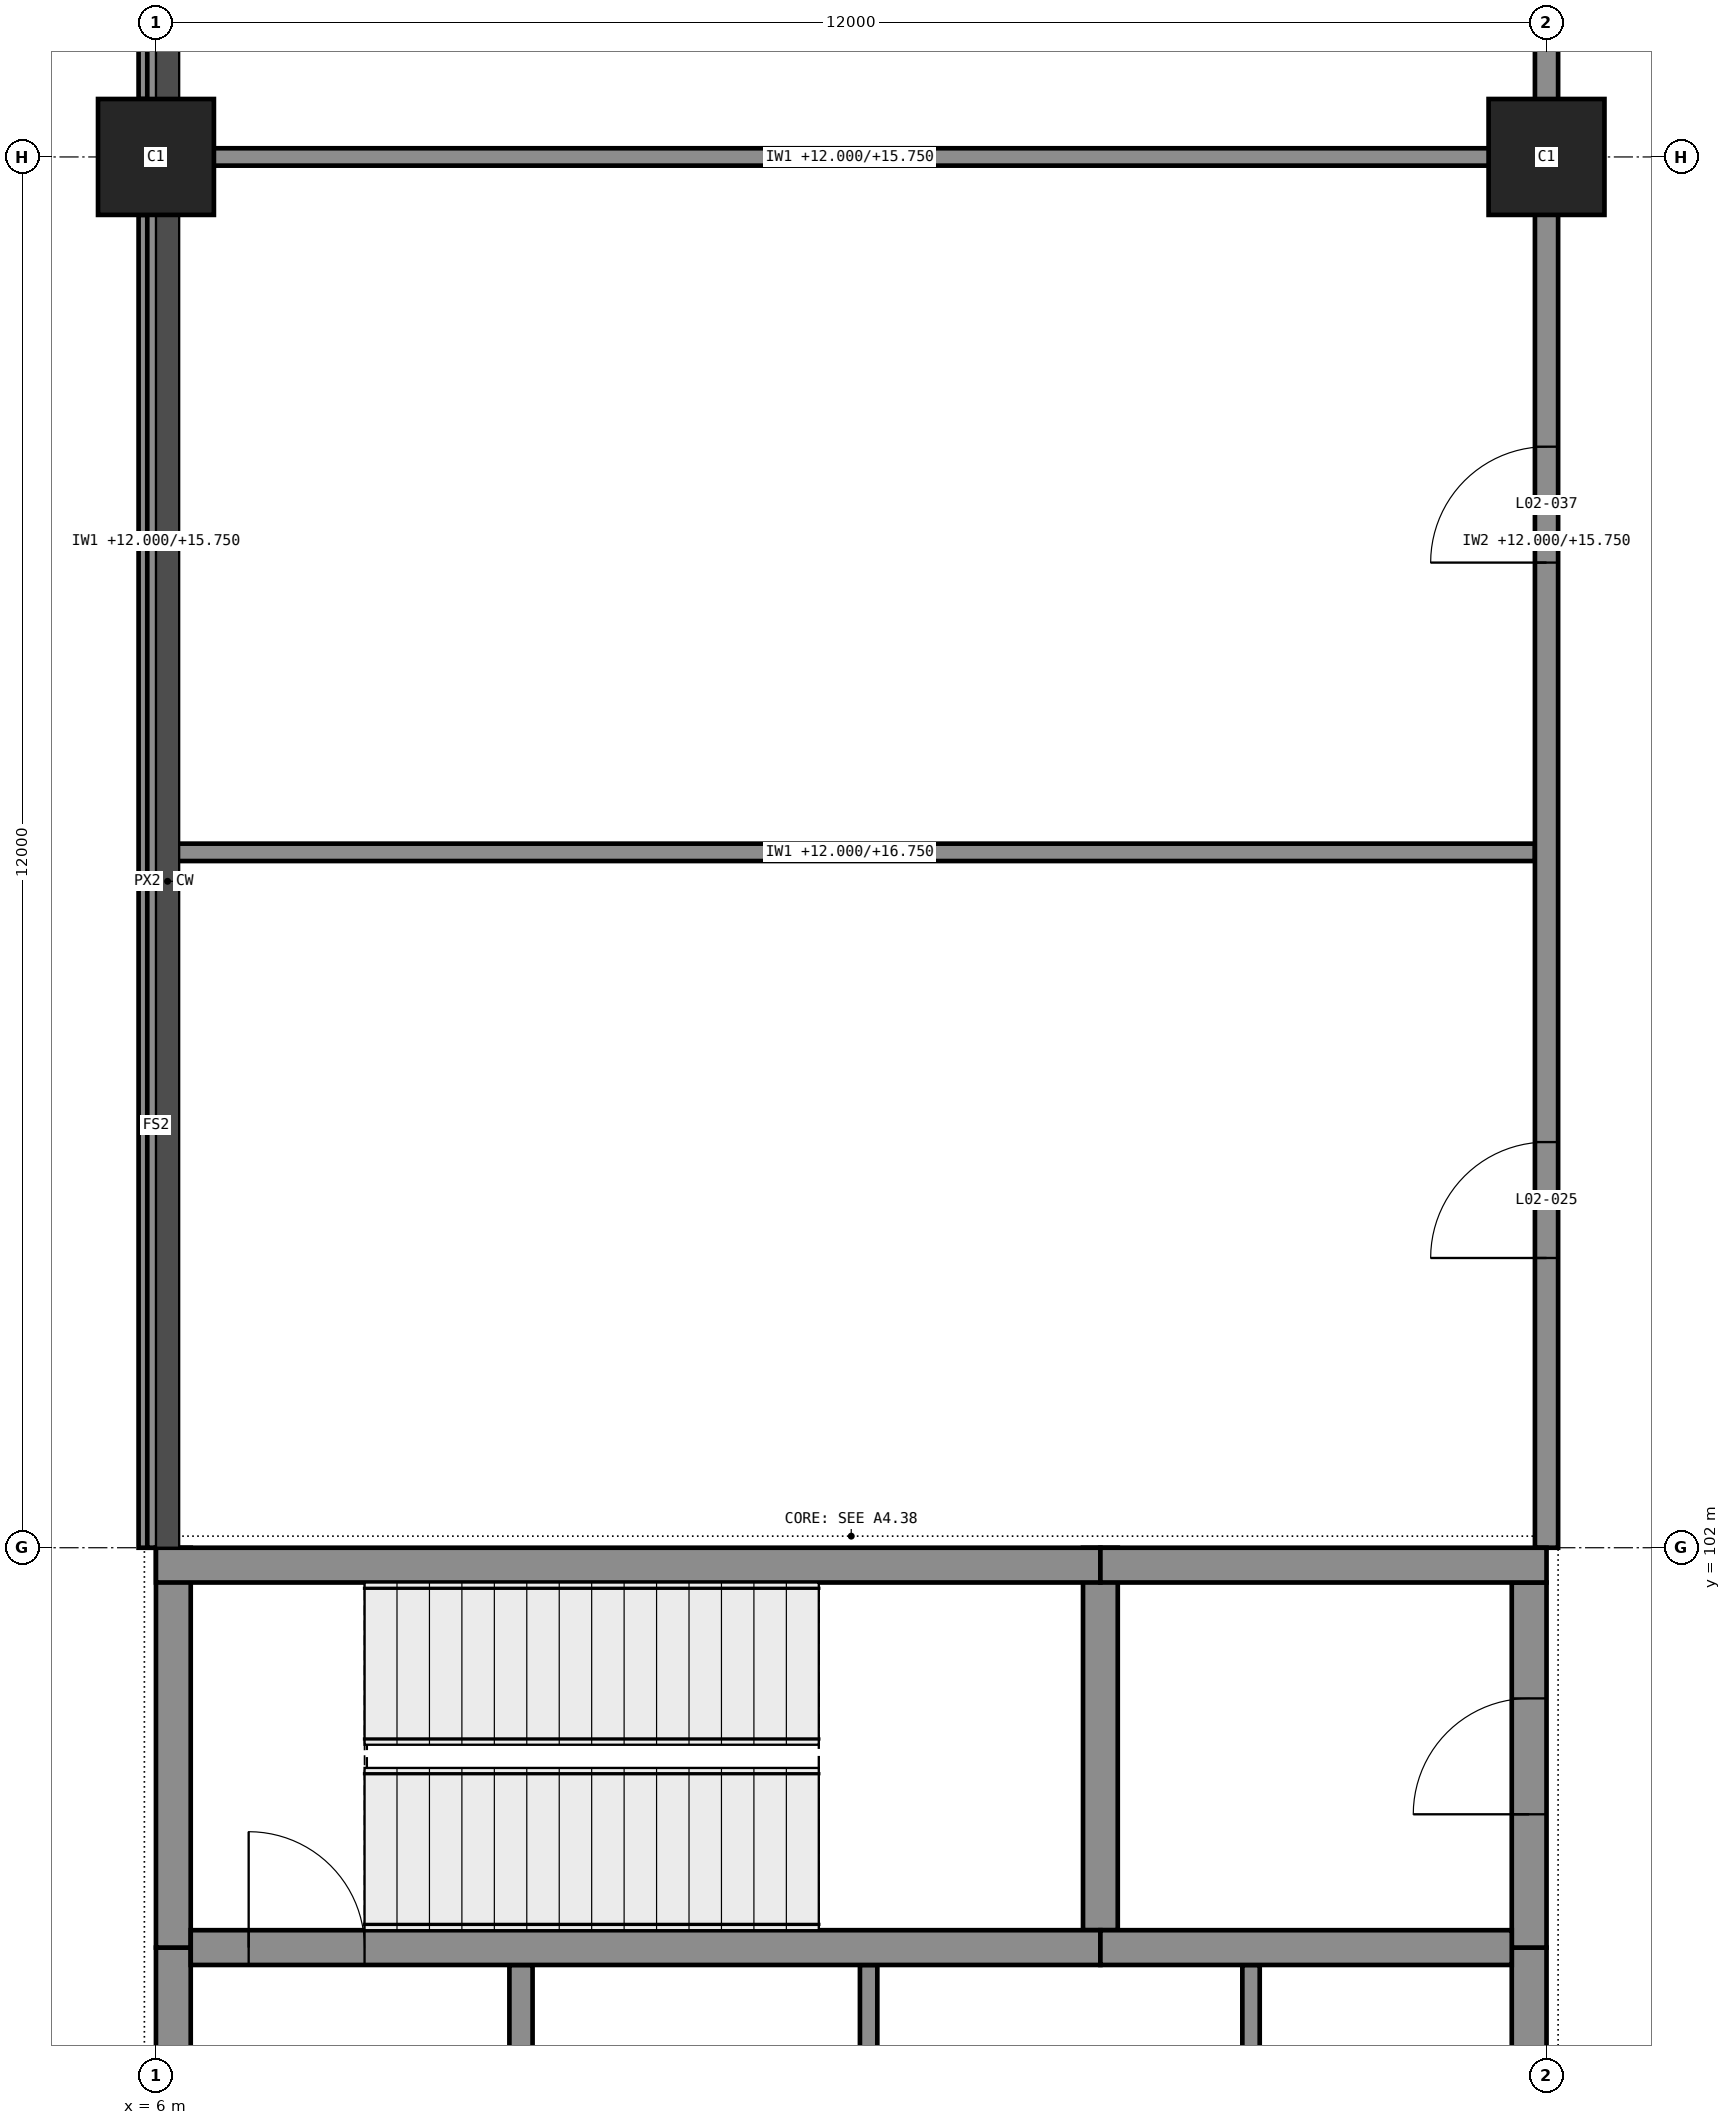
"""IFC4 building model, lengths in metres.
Left out: names, types, materials, properties, quantities, classifications, styles, units other than length and angle.
Written with IfcOpenShell. Run it as: python <this file> out.ifc"""

import sys

from ifc_helpers import new_model, si_unit, direction, frame, frame_2d, origin, origin_2d, place, context, subcontext, project, spatial, rectangle, extrude, element, fill, save


model = new_model("IFC4")
c1 = context("Model", 3, precision=1e-05, world=origin(), true_north=direction((0.0, 1.0)))
c2 = subcontext(c1, "Body", "Model", "MODEL_VIEW")
j1 = project(units=[si_unit("LENGTHUNIT", "METRE"), si_unit("PLANEANGLEUNIT", "RADIAN")], contexts=[c1])
p1 = place(None, origin())
s1 = spatial("IfcSite", under=j1, at=p1, CompositionType="ELEMENT")
p2 = place(p1, origin())
s2 = spatial("IfcBuilding", under=s1, at=p2, CompositionType="ELEMENT")
p3 = place(p2, frame((0.0, 0.0, 12.0)))
s3 = spatial("IfcBuildingStorey", under=s2, at=p3, CompositionType="ELEMENT", Elevation=12.0)
for number, where, z_axis, x_axis in (
    (1, (6.0, 114.0, 0.0), (0.0, 0.0, 1.0), (1.0, 0.0, 0.0)),
    (2, (18.0, 114.0, 0.0), (0.0, 0.0, 1.0), (1.0, 0.0, 0.0)),
):
    element("IfcColumn", number, at=place(p3, frame(where, z_axis=z_axis, x_axis=x_axis)), inside=s3, PredefinedType="COLUMN", context=c2, shape_type="SweptSolid", body=[
        extrude(rectangle(XDim=1.0, YDim=1.0, at=origin_2d()), origin(), (0.0, 0.0, 1.0), 5.0),
    ])
p4 = place(p3, frame((6.0, 101.85, 0.0), z_axis=(0.0, 0.0, 1.0), x_axis=(1.0, 0.0, 0.0)))
e3 = element("IfcWall", 3, at=p4, inside=s3, PredefinedType="SHEAR", context=c2, shape_type="SweptSolid", body=[
    extrude(rectangle(XDim=8.15, YDim=0.3, at=frame_2d((4.075, 0.0))), origin(), (0.0, 0.0, 1.0), 4.75),
])
p5 = place(p3, frame((14.15, 101.85, 0.0), z_axis=(0.0, 0.0, 1.0), x_axis=(1.0, 0.0, 0.0)))
e4 = element("IfcWall", 4, at=p5, inside=s3, PredefinedType="SHEAR", context=c2, shape_type="SweptSolid", body=[
    extrude(rectangle(XDim=3.85, YDim=0.3, at=frame_2d((1.925, 0.0))), origin(), (0.0, 0.0, 1.0), 4.75),
])
p6 = place(p3, frame((6.3, 98.55, 0.0), z_axis=(0.0, 0.0, 1.0), x_axis=(1.0, 0.0, 0.0)))
e5 = element("IfcWall", 5, at=p6, inside=s3, PredefinedType="SHEAR", context=c2, shape_type="SweptSolid", body=[
    extrude(rectangle(XDim=7.85, YDim=0.3, at=frame_2d((3.925, 0.0))), origin(), (0.0, 0.0, 1.0), 4.75),
])
p7 = place(p6, frame((0.5, 0.0, 0.0)))
e6 = element("IfcOpeningElement", 6, at=p7, cuts=e5, PredefinedType="OPENING", context=c2, shape_type="SweptSolid", body=[
    extrude(rectangle(XDim=1.0, YDim=2.1, at=frame_2d((0.5, 1.05))), frame((0.0, 0.16, 0.0), z_axis=(0.0, -1.0, 0.0), x_axis=(1.0, 0.0, 0.0)), (0.0, 0.0, 1.0), 0.32),
])
p8 = place(p3, frame((14.15, 98.55, 0.0), z_axis=(0.0, 0.0, 1.0), x_axis=(1.0, 0.0, 0.0)))
e7 = element("IfcWall", 7, at=p8, inside=s3, PredefinedType="SHEAR", context=c2, shape_type="SweptSolid", body=[
    extrude(rectangle(XDim=3.55, YDim=0.3, at=frame_2d((1.775, 0.0))), origin(), (0.0, 0.0, 1.0), 4.75),
])
p9 = place(p3, frame((6.15, 93.45, 0.0), z_axis=(0.0, 0.0, 1.0), x_axis=(0.0, 1.0, 0.0)))
e8 = element("IfcWall", 8, at=p9, inside=s3, PredefinedType="SHEAR", context=c2, shape_type="SweptSolid", body=[
    extrude(rectangle(XDim=5.1, YDim=0.3, at=frame_2d((2.55, 0.0))), origin(), (0.0, 0.0, 1.0), 4.75),
])
p10 = place(p3, frame((6.15, 98.55, 0.0), z_axis=(0.0, 0.0, 1.0), x_axis=(0.0, 1.0, 0.0)))
e9 = element("IfcWall", 9, at=p10, inside=s3, PredefinedType="SHEAR", context=c2, shape_type="SweptSolid", body=[
    extrude(rectangle(XDim=3.45, YDim=0.3, at=frame_2d((1.725, 0.0))), origin(), (0.0, 0.0, 1.0), 4.75),
])
p11 = place(p3, frame((17.85, 93.45, 0.0), z_axis=(0.0, 0.0, 1.0), x_axis=(0.0, 1.0, 0.0)))
e10 = element("IfcWall", 10, at=p11, inside=s3, PredefinedType="SHEAR", context=c2, shape_type="SweptSolid", body=[
    extrude(rectangle(XDim=5.1, YDim=0.3, at=frame_2d((2.55, 0.0))), origin(), (0.0, 0.0, 1.0), 4.75),
])
p12 = place(p11, frame((0.3, 0.0, 0.0)))
e11 = element("IfcOpeningElement", 11, at=p12, cuts=e10, PredefinedType="OPENING", context=c2, shape_type="SweptSolid", body=[
    extrude(rectangle(XDim=1.5, YDim=2.1, at=frame_2d((0.75, 1.05))), frame((0.0, 0.16, 0.0), z_axis=(0.0, -1.0, 0.0), x_axis=(1.0, 0.0, 0.0)), (0.0, 0.0, 1.0), 0.32),
])
p13 = place(p3, frame((17.85, 98.55, 0.0), z_axis=(0.0, 0.0, 1.0), x_axis=(0.0, 1.0, 0.0)))
e12 = element("IfcWall", 12, at=p13, inside=s3, PredefinedType="SHEAR", context=c2, shape_type="SweptSolid", body=[
    extrude(rectangle(XDim=3.15, YDim=0.3, at=frame_2d((1.575, 0.0))), origin(), (0.0, 0.0, 1.0), 4.75),
])
p14 = place(p13, frame((1.15, 0.0, 0.0)))
e13 = element("IfcOpeningElement", 13, at=p14, cuts=e12, PredefinedType="OPENING", context=c2, shape_type="SweptSolid", body=[
    extrude(rectangle(XDim=1.0, YDim=2.1, at=frame_2d((0.5, 1.05))), frame((0.0, 0.16, 0.0), z_axis=(0.0, -1.0, 0.0), x_axis=(1.0, 0.0, 0.0)), (0.0, 0.0, 1.0), 0.32),
])
p15 = place(p3, frame((14.15, 98.7, 0.0), z_axis=(0.0, 0.0, 1.0), x_axis=(0.0, 1.0, 0.0)))
e14 = element("IfcWall", 14, at=p15, inside=s3, PredefinedType="SHEAR", context=c2, shape_type="SweptSolid", body=[
    extrude(rectangle(XDim=3.3, YDim=0.3, at=frame_2d((1.65, 0.0))), origin(), (0.0, 0.0, 1.0), 4.75),
])
p16 = place(p3, frame((5.925, 125.5, 4.75), z_axis=(0.0, 0.0, 1.0), x_axis=(0.0, -1.0, 0.0)))
e15 = element("IfcWall", 15, at=p16, inside=s3, PredefinedType="STANDARD", context=c2, shape_type="SweptSolid", body=[
    extrude(rectangle(XDim=11.0, YDim=0.15, at=frame_2d((5.5, 0.0))), origin(), (0.0, 0.0, 1.0), 0.25),
])
p17 = place(p3, frame((5.925, 113.5, 4.75), z_axis=(0.0, 0.0, 1.0), x_axis=(0.0, -1.0, 0.0)))
e16 = element("IfcWall", 16, at=p17, inside=s3, PredefinedType="STANDARD", context=c2, shape_type="SweptSolid", body=[
    extrude(rectangle(XDim=11.5, YDim=0.15, at=frame_2d((5.75, 0.0))), origin(), (0.0, 0.0, 1.0), 0.25),
])
p18 = place(p3, frame((6.075, 108.0, 0.0), z_axis=(0.0, 0.0, 1.0), x_axis=(1.0, 0.0, 0.0)))
e17 = element("IfcWall", 17, at=p18, inside=s3, PredefinedType="PARTITIONING", context=c2, shape_type="SweptSolid", body=[
    extrude(rectangle(XDim=11.825, YDim=0.15, at=frame_2d((5.913, 0.0))), origin(), (0.0, 0.0, 1.0), 4.75),
])
p19 = place(p3, frame((6.075, 114.0, 0.0), z_axis=(0.0, 0.0, 1.0), x_axis=(1.0, 0.0, 0.0)))
e18 = element("IfcWall", 18, at=p19, inside=s3, PredefinedType="PARTITIONING", context=c2, shape_type="SweptSolid", body=[
    extrude(rectangle(XDim=11.825, YDim=0.15, at=frame_2d((5.913, 0.0))), origin(), (0.0, 0.0, 1.0), 3.75),
])
p20 = place(p3, frame((6.0, 102.0, 0.0), z_axis=(0.0, 0.0, 1.0), x_axis=(0.0, 1.0, 0.0)))
e19 = element("IfcWall", 19, at=p20, inside=s3, PredefinedType="PARTITIONING", context=c2, shape_type="SweptSolid", body=[
    extrude(rectangle(XDim=48.0, YDim=0.15, at=frame_2d((24.0, 0.0))), origin(), (0.0, 0.0, 1.0), 3.75),
])
p21 = place(p3, frame((9.15, 95.65, 0.0), z_axis=(0.0, 0.0, 1.0), x_axis=(0.0, 1.0, 0.0)))
e20 = element("IfcWall", 20, at=p21, inside=s3, PredefinedType="PARTITIONING", context=c2, shape_type="SweptSolid", body=[
    extrude(rectangle(XDim=2.75, YDim=0.2, at=frame_2d((1.375, 0.0))), origin(), (0.0, 0.0, 1.0), 4.75),
])
for number, where, z_axis, x_axis in (
    (21, (12.15, 95.65, 0.0), (0.0, 0.0, 1.0), (0.0, 1.0, 0.0)),
    (22, (15.45, 95.65, 0.0), (0.0, 0.0, 1.0), (0.0, 1.0, 0.0)),
):
    element("IfcWall", number, at=place(p3, frame(where, z_axis=z_axis, x_axis=x_axis)), inside=s3, PredefinedType="PARTITIONING", context=c2, shape_type="SweptSolid", body=[
        extrude(rectangle(XDim=2.75, YDim=0.15, at=frame_2d((1.375, 0.0))), origin(), (0.0, 0.0, 1.0), 4.75),
    ])
p22 = place(p3, frame((18.0, 102.0, 0.0), z_axis=(0.0, 0.0, 1.0), x_axis=(0.0, 1.0, 0.0)))
e23 = element("IfcWall", 23, at=p22, inside=s3, PredefinedType="PARTITIONING", context=c2, shape_type="SweptSolid", body=[
    extrude(rectangle(XDim=48.0, YDim=0.2, at=frame_2d((24.0, 0.0))), origin(), (0.0, 0.0, 1.0), 3.75),
])
p23 = place(p22, frame((2.5, 0.0, 0.0)))
e24 = element("IfcOpeningElement", 24, at=p23, cuts=e23, PredefinedType="OPENING", context=c2, shape_type="SweptSolid", body=[
    extrude(rectangle(XDim=1.0, YDim=2.1, at=frame_2d((0.5, 1.05))), frame((0.0, 0.11, 0.0), z_axis=(0.0, -1.0, 0.0), x_axis=(1.0, 0.0, 0.0)), (0.0, 0.0, 1.0), 0.22),
])
p24 = place(p22, frame((8.5, 0.0, 0.0)))
e25 = element("IfcOpeningElement", 25, at=p24, cuts=e23, PredefinedType="OPENING", context=c2, shape_type="SweptSolid", body=[
    extrude(rectangle(XDim=1.0, YDim=2.1, at=frame_2d((0.5, 1.05))), frame((0.0, 0.11, 0.0), z_axis=(0.0, -1.0, 0.0), x_axis=(1.0, 0.0, 0.0)), (0.0, 0.0, 1.0), 0.22),
])
p25 = place(p22, frame((14.5, 0.0, 0.0)))
e26 = element("IfcOpeningElement", 26, at=p25, cuts=e23, PredefinedType="OPENING", context=c2, shape_type="SweptSolid", body=[
    extrude(rectangle(XDim=1.0, YDim=2.1, at=frame_2d((0.5, 1.05))), frame((0.0, 0.11, 0.0), z_axis=(0.0, -1.0, 0.0), x_axis=(1.0, 0.0, 0.0)), (0.0, 0.0, 1.0), 0.22),
])
p26 = place(p22, frame((20.5, 0.0, 0.0)))
e27 = element("IfcOpeningElement", 27, at=p26, cuts=e23, PredefinedType="OPENING", context=c2, shape_type="SweptSolid", body=[
    extrude(rectangle(XDim=1.0, YDim=2.1, at=frame_2d((0.5, 1.05))), frame((0.0, 0.11, 0.0), z_axis=(0.0, -1.0, 0.0), x_axis=(1.0, 0.0, 0.0)), (0.0, 0.0, 1.0), 0.22),
])
p27 = place(p22, frame((26.5, 0.0, 0.0)))
e28 = element("IfcOpeningElement", 28, at=p27, cuts=e23, PredefinedType="OPENING", context=c2, shape_type="SweptSolid", body=[
    extrude(rectangle(XDim=1.0, YDim=2.1, at=frame_2d((0.5, 1.05))), frame((0.0, 0.11, 0.0), z_axis=(0.0, -1.0, 0.0), x_axis=(1.0, 0.0, 0.0)), (0.0, 0.0, 1.0), 0.22),
])
p28 = place(p22, frame((32.5, 0.0, 0.0)))
e29 = element("IfcOpeningElement", 29, at=p28, cuts=e23, PredefinedType="OPENING", context=c2, shape_type="SweptSolid", body=[
    extrude(rectangle(XDim=1.0, YDim=2.1, at=frame_2d((0.5, 1.05))), frame((0.0, 0.11, 0.0), z_axis=(0.0, -1.0, 0.0), x_axis=(1.0, 0.0, 0.0)), (0.0, 0.0, 1.0), 0.22),
])
p29 = place(p22, frame((38.5, 0.0, 0.0)))
e30 = element("IfcOpeningElement", 30, at=p29, cuts=e23, PredefinedType="OPENING", context=c2, shape_type="SweptSolid", body=[
    extrude(rectangle(XDim=1.0, YDim=2.1, at=frame_2d((0.5, 1.05))), frame((0.0, 0.11, 0.0), z_axis=(0.0, -1.0, 0.0), x_axis=(1.0, 0.0, 0.0)), (0.0, 0.0, 1.0), 0.22),
])
p30 = place(p22, frame((44.5, 0.0, 0.0)))
e31 = element("IfcOpeningElement", 31, at=p30, cuts=e23, PredefinedType="OPENING", context=c2, shape_type="SweptSolid", body=[
    extrude(rectangle(XDim=1.0, YDim=2.1, at=frame_2d((0.5, 1.05))), frame((0.0, 0.11, 0.0), z_axis=(0.0, -1.0, 0.0), x_axis=(1.0, 0.0, 0.0)), (0.0, 0.0, 1.0), 0.22),
])
p31 = place(p7, origin())
e32 = element("IfcDoor", 32, at=p31, inside=s3, OperationType="SINGLE_SWING_RIGHT", PredefinedType="DOOR", context=c2, shape_type="SweptSolid", body=[
    extrude(rectangle(XDim=1.0, YDim=2.1, at=frame_2d((0.5, 1.05))), frame((0.0, 0.025, 0.0), z_axis=(0.0, -1.0, 0.0), x_axis=(1.0, 0.0, 0.0)), (0.0, 0.0, 1.0), 0.05),
])
fill(e6, e32)
p32 = place(p14, origin())
e33 = element("IfcDoor", 33, at=p32, inside=s3, OperationType="SINGLE_SWING_RIGHT", PredefinedType="DOOR", context=c2, shape_type="SweptSolid", body=[
    extrude(rectangle(XDim=1.0, YDim=2.1, at=frame_2d((0.5, 1.05))), frame((0.0, 0.025, 0.0), z_axis=(0.0, -1.0, 0.0), x_axis=(1.0, 0.0, 0.0)), (0.0, 0.0, 1.0), 0.05),
])
fill(e13, e33)
p33 = place(p23, origin())
e34 = element("IfcDoor", 34, at=p33, inside=s3, OperationType="SINGLE_SWING_RIGHT", PredefinedType="DOOR", context=c2, shape_type="SweptSolid", body=[
    extrude(rectangle(XDim=1.0, YDim=2.1, at=frame_2d((0.5, 1.05))), frame((0.0, 0.025, 0.0), z_axis=(0.0, -1.0, 0.0), x_axis=(1.0, 0.0, 0.0)), (0.0, 0.0, 1.0), 0.05),
])
fill(e24, e34)
p34 = place(p24, origin())
e35 = element("IfcDoor", 35, at=p34, inside=s3, OperationType="SINGLE_SWING_RIGHT", PredefinedType="DOOR", context=c2, shape_type="SweptSolid", body=[
    extrude(rectangle(XDim=1.0, YDim=2.1, at=frame_2d((0.5, 1.05))), frame((0.0, 0.025, 0.0), z_axis=(0.0, -1.0, 0.0), x_axis=(1.0, 0.0, 0.0)), (0.0, 0.0, 1.0), 0.05),
])
fill(e25, e35)
save(model, sys.argv[1])
